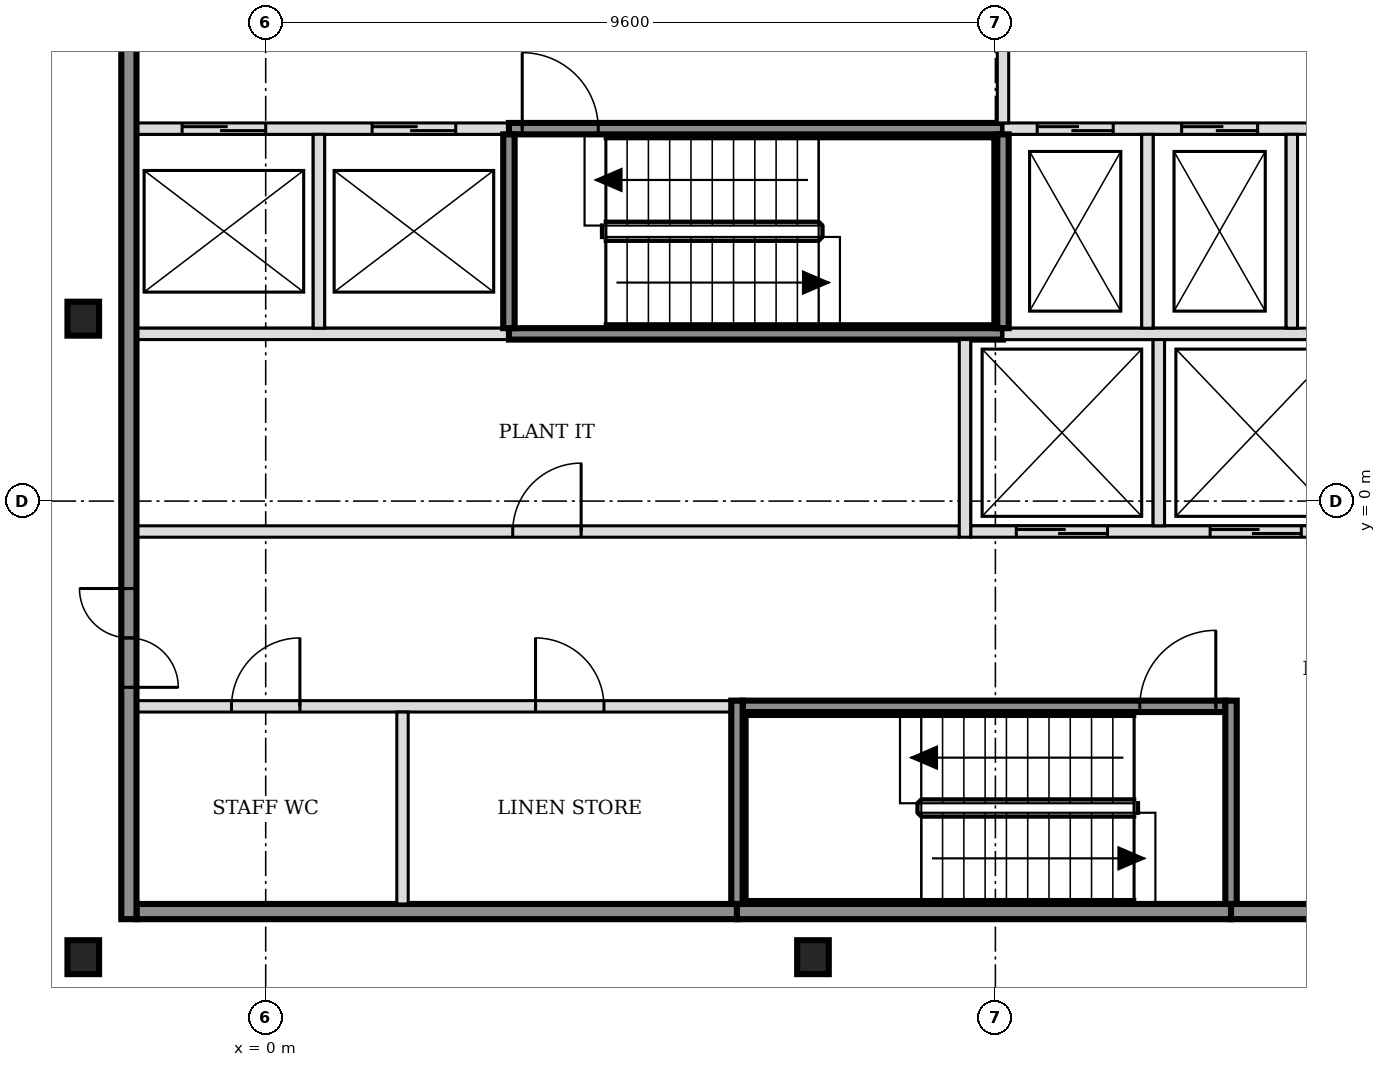
"""IFC4 building model, lengths in metres.
Left out: names, types, materials, properties, quantities, classifications, styles, units other than length and angle.
Written with IfcOpenShell. Run it as: python <this file> out.ifc"""

import sys

from ifc_helpers import new_model, si_unit, direction, frame, frame_2d, origin, origin_2d, place, context, subcontext, project, spatial, rectangle, i_section, extrude, element, fill, save


model = new_model("IFC4")
c1 = context("Model", 3, precision=1e-05, world=origin(), true_north=direction((0.0, 1.0)))
c2 = subcontext(c1, "Body", "Model", "MODEL_VIEW")
j1 = project(units=[si_unit("LENGTHUNIT", "METRE"), si_unit("PLANEANGLEUNIT", "RADIAN")], contexts=[c1])
p1 = place(None, origin())
s1 = spatial("IfcSite", under=j1, at=p1, CompositionType="ELEMENT")
p2 = place(p1, origin())
s2 = spatial("IfcBuilding", under=s1, at=p2, CompositionType="ELEMENT")
p3 = place(p2, frame((0.0, 0.0, 186.6)))
s3 = spatial("IfcBuildingStorey", under=s2, at=p3, CompositionType="ELEMENT", Elevation=186.6)
for number, where, z_axis, x_axis in (
    (1, (-2.4, -6.0, -0.15), (0.0, 0.0, 1.0), (1.0, 0.0, 0.0)),
    (2, (7.2, -6.0, -0.15), (0.0, 0.0, 1.0), (1.0, 0.0, 0.0)),
    (3, (-2.4, 2.4, -0.15), (0.0, 0.0, 1.0), (1.0, 0.0, 0.0)),
):
    element("IfcColumn", number, at=place(p3, frame(where, z_axis=z_axis, x_axis=x_axis)), inside=s3, PredefinedType="COLUMN", context=c2, shape_type="SweptSolid", body=[
        extrude(i_section(OverallWidth=0.416, OverallDepth=0.446, WebThickness=0.039, FlangeThickness=0.063, FilletRadius=0.015, at=origin_2d()), origin(), (0.0, 0.0, 1.0), 3.6),
    ])
p4 = place(p3, frame((-1.7, -5.4, 0.0), z_axis=(0.0, 0.0, 1.0), x_axis=(1.0, 0.0, 0.0)))
e4 = element("IfcWall", 4, at=p4, inside=s3, PredefinedType="SOLIDWALL", context=c2, shape_type="SweptSolid", body=[
    extrude(rectangle(XDim=7.9, YDim=0.2, at=frame_2d((3.95, 0.0))), origin(), (0.0, 0.0, 1.0), 3.45),
])
p5 = place(p3, frame((6.2, -5.4, 0.0), z_axis=(0.0, 0.0, 1.0), x_axis=(1.0, 0.0, 0.0)))
e5 = element("IfcWall", 5, at=p5, inside=s3, PredefinedType="SOLIDWALL", context=c2, shape_type="SweptSolid", body=[
    extrude(rectangle(XDim=6.5, YDim=0.2, at=frame_2d((3.25, 0.0))), origin(), (0.0, 0.0, 1.0), 3.45),
])
p6 = place(p3, frame((12.7, -5.4, 0.0), z_axis=(0.0, 0.0, 1.0), x_axis=(1.0, 0.0, 0.0)))
e6 = element("IfcWall", 6, at=p6, inside=s3, PredefinedType="SOLIDWALL", context=c2, shape_type="SweptSolid", body=[
    extrude(rectangle(XDim=3.4, YDim=0.2, at=frame_2d((1.7, 0.0))), origin(), (0.0, 0.0, 1.0), 3.45),
])
p7 = place(p3, frame((-1.7, -2.7, 0.0), z_axis=(0.0, 0.0, 1.0), x_axis=(1.0, 0.0, 0.0)))
e7 = element("IfcWall", 7, at=p7, inside=s3, PredefinedType="PARTITIONING", context=c2, shape_type="SweptSolid", body=[
    extrude(rectangle(XDim=7.825, YDim=0.15, at=frame_2d((3.913, 0.0))), origin(), (0.0, 0.0, 1.0), 3.45),
])
p8 = place(p7, frame((1.25, 0.0, 0.0)))
e8 = element("IfcOpeningElement", 8, at=p8, cuts=e7, PredefinedType="OPENING", context=c2, shape_type="SweptSolid", body=[
    extrude(rectangle(XDim=0.9, YDim=2.1, at=frame_2d((0.45, 1.05))), frame((0.0, 0.085, 0.0), z_axis=(0.0, -1.0, 0.0), x_axis=(1.0, 0.0, 0.0)), (0.0, 0.0, 1.0), 0.17),
])
p9 = place(p7, frame((5.25, 0.0, 0.0)))
e9 = element("IfcOpeningElement", 9, at=p9, cuts=e7, PredefinedType="OPENING", context=c2, shape_type="SweptSolid", body=[
    extrude(rectangle(XDim=0.9, YDim=2.1, at=frame_2d((0.45, 1.05))), frame((0.0, 0.085, 0.0), z_axis=(0.0, -1.0, 0.0), x_axis=(1.0, 0.0, 0.0)), (0.0, 0.0, 1.0), 0.17),
])
p10 = place(p3, frame((6.275, -2.7, 0.0), z_axis=(0.0, 0.0, 1.0), x_axis=(1.0, 0.0, 0.0)))
e10 = element("IfcWall", 10, at=p10, inside=s3, PredefinedType="SOLIDWALL", context=c2, shape_type="SweptSolid", body=[
    extrude(rectangle(XDim=6.35, YDim=0.15, at=frame_2d((3.175, 0.0))), origin(), (0.0, 0.0, 1.0), 3.45),
])
p11 = place(p10, frame((5.225, 0.0, 0.0)))
e11 = element("IfcOpeningElement", 11, at=p11, cuts=e10, PredefinedType="OPENING", context=c2, shape_type="SweptSolid", body=[
    extrude(rectangle(XDim=1.0, YDim=2.1, at=frame_2d((0.5, 1.05))), frame((0.0, 0.085, 0.0), z_axis=(0.0, -1.0, 0.0), x_axis=(1.0, 0.0, 0.0)), (0.0, 0.0, 1.0), 0.17),
])
p12 = place(p3, frame((-1.7, -0.4, 0.0), z_axis=(0.0, 0.0, 1.0), x_axis=(1.0, 0.0, 0.0)))
e12 = element("IfcWall", 12, at=p12, inside=s3, PredefinedType="PARTITIONING", context=c2, shape_type="SweptSolid", body=[
    extrude(rectangle(XDim=10.825, YDim=0.15, at=frame_2d((5.413, 0.0))), origin(), (0.0, 0.0, 1.0), 3.45),
])
p13 = place(p12, frame((4.95, 0.0, 0.0)))
e13 = element("IfcOpeningElement", 13, at=p13, cuts=e12, PredefinedType="OPENING", context=c2, shape_type="SweptSolid", body=[
    extrude(rectangle(XDim=0.9, YDim=2.1, at=frame_2d((0.45, 1.05))), frame((0.0, 0.085, 0.0), z_axis=(0.0, -1.0, 0.0), x_axis=(1.0, 0.0, 0.0)), (0.0, 0.0, 1.0), 0.17),
])
p14 = place(p3, frame((9.275, -0.4, 0.0), z_axis=(0.0, 0.0, 1.0), x_axis=(1.0, 0.0, 0.0)))
e14 = element("IfcWall", 14, at=p14, inside=s3, PredefinedType="SOLIDWALL", context=c2, shape_type="SweptSolid", body=[
    extrude(rectangle(XDim=4.95, YDim=0.15, at=frame_2d((2.475, 0.0))), origin(), (0.0, 0.0, 1.0), 3.45),
])
p15 = place(p14, frame((0.6, 0.0, 0.0)))
e15 = element("IfcOpeningElement", 15, at=p15, cuts=e14, PredefinedType="OPENING", context=c2, shape_type="SweptSolid", body=[
    extrude(rectangle(XDim=1.2, YDim=2.1, at=frame_2d((0.6, 1.05))), frame((0.0, 0.085, 0.0), z_axis=(0.0, -1.0, 0.0), x_axis=(1.0, 0.0, 0.0)), (0.0, 0.0, 1.0), 0.17),
])
p16 = place(p14, frame((3.15, 0.0, 0.0)))
e16 = element("IfcOpeningElement", 16, at=p16, cuts=e14, PredefinedType="OPENING", context=c2, shape_type="SweptSolid", body=[
    extrude(rectangle(XDim=1.2, YDim=2.1, at=frame_2d((0.6, 1.05))), frame((0.0, 0.085, 0.0), z_axis=(0.0, -1.0, 0.0), x_axis=(1.0, 0.0, 0.0)), (0.0, 0.0, 1.0), 0.17),
])
p17 = place(p3, frame((-1.7, 2.2, 0.0), z_axis=(0.0, 0.0, 1.0), x_axis=(1.0, 0.0, 0.0)))
e17 = element("IfcWall", 17, at=p17, inside=s3, PredefinedType="SOLIDWALL", context=c2, shape_type="SweptSolid", body=[
    extrude(rectangle(XDim=4.9, YDim=0.15, at=frame_2d((2.45, 0.0))), origin(), (0.0, 0.0, 1.0), 3.45),
])
p18 = place(p3, frame((3.2, 2.2, 0.0), z_axis=(0.0, 0.0, 1.0), x_axis=(1.0, 0.0, 0.0)))
e18 = element("IfcWall", 18, at=p18, inside=s3, PredefinedType="SOLIDWALL", context=c2, shape_type="SweptSolid", body=[
    extrude(rectangle(XDim=6.5, YDim=0.15, at=frame_2d((3.25, 0.0))), origin(), (0.0, 0.0, 1.0), 3.45),
])
p19 = place(p3, frame((9.7, 2.2, 0.0), z_axis=(0.0, 0.0, 1.0), x_axis=(1.0, 0.0, 0.0)))
e19 = element("IfcWall", 19, at=p19, inside=s3, PredefinedType="SOLIDWALL", context=c2, shape_type="SweptSolid", body=[
    extrude(rectangle(XDim=4.525, YDim=0.15, at=frame_2d((2.263, 0.0))), origin(), (0.0, 0.0, 1.0), 3.45),
])
p20 = place(p3, frame((-1.7, 4.9, 0.0), z_axis=(0.0, 0.0, 1.0), x_axis=(1.0, 0.0, 0.0)))
e20 = element("IfcWall", 20, at=p20, inside=s3, PredefinedType="SOLIDWALL", context=c2, shape_type="SweptSolid", body=[
    extrude(rectangle(XDim=4.9, YDim=0.15, at=frame_2d((2.45, 0.0))), origin(), (0.0, 0.0, 1.0), 3.45),
])
p21 = place(p20, frame((0.6, 0.0, 0.0)))
e21 = element("IfcOpeningElement", 21, at=p21, cuts=e20, PredefinedType="OPENING", context=c2, shape_type="SweptSolid", body=[
    extrude(rectangle(XDim=1.1, YDim=2.1, at=frame_2d((0.55, 1.05))), frame((0.0, 0.085, 0.0), z_axis=(0.0, -1.0, 0.0), x_axis=(1.0, 0.0, 0.0)), (0.0, 0.0, 1.0), 0.17),
])
p22 = place(p20, frame((3.1, 0.0, 0.0)))
e22 = element("IfcOpeningElement", 22, at=p22, cuts=e20, PredefinedType="OPENING", context=c2, shape_type="SweptSolid", body=[
    extrude(rectangle(XDim=1.1, YDim=2.1, at=frame_2d((0.55, 1.05))), frame((0.0, 0.085, 0.0), z_axis=(0.0, -1.0, 0.0), x_axis=(1.0, 0.0, 0.0)), (0.0, 0.0, 1.0), 0.17),
])
p23 = place(p3, frame((3.2, 4.9, 0.0), z_axis=(0.0, 0.0, 1.0), x_axis=(1.0, 0.0, 0.0)))
e23 = element("IfcWall", 23, at=p23, inside=s3, PredefinedType="SOLIDWALL", context=c2, shape_type="SweptSolid", body=[
    extrude(rectangle(XDim=6.5, YDim=0.15, at=frame_2d((3.25, 0.0))), origin(), (0.0, 0.0, 1.0), 3.45),
])
p24 = place(p23, frame((0.175, 0.0, 0.0)))
e24 = element("IfcOpeningElement", 24, at=p24, cuts=e23, PredefinedType="OPENING", context=c2, shape_type="SweptSolid", body=[
    extrude(rectangle(XDim=1.0, YDim=2.1, at=frame_2d((0.5, 1.05))), frame((0.0, 0.085, 0.0), z_axis=(0.0, -1.0, 0.0), x_axis=(1.0, 0.0, 0.0)), (0.0, 0.0, 1.0), 0.17),
])
p25 = place(p3, frame((9.7, 4.9, 0.0), z_axis=(0.0, 0.0, 1.0), x_axis=(1.0, 0.0, 0.0)))
e25 = element("IfcWall", 25, at=p25, inside=s3, PredefinedType="SOLIDWALL", context=c2, shape_type="SweptSolid", body=[
    extrude(rectangle(XDim=6.4, YDim=0.15, at=frame_2d((3.2, 0.0))), origin(), (0.0, 0.0, 1.0), 3.45),
])
p26 = place(p25, frame((0.45, 0.0, 0.0)))
e26 = element("IfcOpeningElement", 26, at=p26, cuts=e25, PredefinedType="OPENING", context=c2, shape_type="SweptSolid", body=[
    extrude(rectangle(XDim=1.0, YDim=2.1, at=frame_2d((0.5, 1.05))), frame((0.0, 0.085, 0.0), z_axis=(0.0, -1.0, 0.0), x_axis=(1.0, 0.0, 0.0)), (0.0, 0.0, 1.0), 0.17),
])
p27 = place(p25, frame((2.35, 0.0, 0.0)))
e27 = element("IfcOpeningElement", 27, at=p27, cuts=e25, PredefinedType="OPENING", context=c2, shape_type="SweptSolid", body=[
    extrude(rectangle(XDim=1.0, YDim=2.1, at=frame_2d((0.5, 1.05))), frame((0.0, 0.085, 0.0), z_axis=(0.0, -1.0, 0.0), x_axis=(1.0, 0.0, 0.0)), (0.0, 0.0, 1.0), 0.17),
])
p28 = place(p25, frame((4.7, 0.0, 0.0)))
e28 = element("IfcOpeningElement", 28, at=p28, cuts=e25, PredefinedType="OPENING", context=c2, shape_type="SweptSolid", body=[
    extrude(rectangle(XDim=0.9, YDim=2.1, at=frame_2d((0.45, 1.05))), frame((0.0, 0.085, 0.0), z_axis=(0.0, -1.0, 0.0), x_axis=(1.0, 0.0, 0.0)), (0.0, 0.0, 1.0), 0.17),
])
p29 = place(p3, frame((-1.8, -5.5, 0.0), z_axis=(0.0, 0.0, 1.0), x_axis=(0.0, 1.0, 0.0)))
e29 = element("IfcWall", 29, at=p29, inside=s3, PredefinedType="SOLIDWALL", context=c2, shape_type="SweptSolid", body=[
    extrude(rectangle(XDim=15.8, YDim=0.2, at=frame_2d((7.9, 0.0))), origin(), (0.0, 0.0, 1.0), 3.45),
])
p30 = place(p29, frame((3.05, 0.0, 0.0)))
e30 = element("IfcOpeningElement", 30, at=p30, cuts=e29, PredefinedType="OPENING", context=c2, shape_type="SweptSolid", body=[
    extrude(rectangle(XDim=1.3, YDim=2.1, at=frame_2d((0.65, 1.05))), frame((0.0, 0.11, 0.0), z_axis=(0.0, -1.0, 0.0), x_axis=(1.0, 0.0, 0.0)), (0.0, 0.0, 1.0), 0.22),
])
p31 = place(p29, frame((11.45, 0.0, 0.0)))
e31 = element("IfcOpeningElement", 31, at=p31, cuts=e29, PredefinedType="OPENING", context=c2, shape_type="SweptSolid", body=[
    extrude(rectangle(XDim=1.3, YDim=2.1, at=frame_2d((0.65, 1.05))), frame((0.0, 0.11, 0.0), z_axis=(0.0, -1.0, 0.0), x_axis=(1.0, 0.0, 0.0)), (0.0, 0.0, 1.0), 0.22),
])
p32 = place(p3, frame((0.7, 2.275, 0.0), z_axis=(0.0, 0.0, 1.0), x_axis=(0.0, 1.0, 0.0)))
e32 = element("IfcWall", 32, at=p32, inside=s3, PredefinedType="SOLIDWALL", context=c2, shape_type="SweptSolid", body=[
    extrude(rectangle(XDim=2.55, YDim=0.15, at=frame_2d((1.275, 0.0))), origin(), (0.0, 0.0, 1.0), 3.45),
])
p33 = place(p3, frame((1.8, -5.3, 0.0), z_axis=(0.0, 0.0, 1.0), x_axis=(0.0, 1.0, 0.0)))
e33 = element("IfcWall", 33, at=p33, inside=s3, PredefinedType="PARTITIONING", context=c2, shape_type="SweptSolid", body=[
    extrude(rectangle(XDim=2.525, YDim=0.15, at=frame_2d((1.263, 0.0))), origin(), (0.0, 0.0, 1.0), 3.45),
])
p34 = place(p3, frame((3.2, 2.275, 0.0), z_axis=(0.0, 0.0, 1.0), x_axis=(0.0, 1.0, 0.0)))
e34 = element("IfcWall", 34, at=p34, inside=s3, PredefinedType="SOLIDWALL", context=c2, shape_type="SweptSolid", body=[
    extrude(rectangle(XDim=2.55, YDim=0.15, at=frame_2d((1.275, 0.0))), origin(), (0.0, 0.0, 1.0), 3.45),
])
p35 = place(p3, frame((6.2, -5.3, 0.0), z_axis=(0.0, 0.0, 1.0), x_axis=(0.0, 1.0, 0.0)))
e35 = element("IfcWall", 35, at=p35, inside=s3, PredefinedType="SOLIDWALL", context=c2, shape_type="SweptSolid", body=[
    extrude(rectangle(XDim=2.675, YDim=0.15, at=frame_2d((1.337, 0.0))), origin(), (0.0, 0.0, 1.0), 3.45),
])
p36 = place(p3, frame((9.2, -0.475, 0.0), z_axis=(0.0, 0.0, 1.0), x_axis=(0.0, 1.0, 0.0)))
e36 = element("IfcWall", 36, at=p36, inside=s3, PredefinedType="SOLIDWALL", context=c2, shape_type="SweptSolid", body=[
    extrude(rectangle(XDim=2.6, YDim=0.15, at=frame_2d((1.3, 0.0))), origin(), (0.0, 0.0, 1.0), 3.45),
])
p37 = place(p3, frame((9.7, 2.275, 0.0), z_axis=(0.0, 0.0, 1.0), x_axis=(0.0, 1.0, 0.0)))
e37 = element("IfcWall", 37, at=p37, inside=s3, PredefinedType="SOLIDWALL", context=c2, shape_type="SweptSolid", body=[
    extrude(rectangle(XDim=2.55, YDim=0.15, at=frame_2d((1.275, 0.0))), origin(), (0.0, 0.0, 1.0), 3.45),
])
p38 = place(p3, frame((9.7, 4.975, 0.0), z_axis=(0.0, 0.0, 1.0), x_axis=(0.0, 1.0, 0.0)))
e38 = element("IfcWall", 38, at=p38, inside=s3, PredefinedType="SOLIDWALL", context=c2, shape_type="SweptSolid", body=[
    extrude(rectangle(XDim=2.45, YDim=0.15, at=frame_2d((1.225, 0.0))), origin(), (0.0, 0.0, 1.0), 3.45),
])
p39 = place(p3, frame((11.6, 2.275, 0.0), z_axis=(0.0, 0.0, 1.0), x_axis=(0.0, 1.0, 0.0)))
e39 = element("IfcWall", 39, at=p39, inside=s3, PredefinedType="SOLIDWALL", context=c2, shape_type="SweptSolid", body=[
    extrude(rectangle(XDim=2.55, YDim=0.15, at=frame_2d((1.275, 0.0))), origin(), (0.0, 0.0, 1.0), 3.45),
])
p40 = place(p3, frame((11.75, -0.325, 0.0), z_axis=(0.0, 0.0, 1.0), x_axis=(0.0, 1.0, 0.0)))
e40 = element("IfcWall", 40, at=p40, inside=s3, PredefinedType="SOLIDWALL", context=c2, shape_type="SweptSolid", body=[
    extrude(rectangle(XDim=2.45, YDim=0.15, at=frame_2d((1.225, 0.0))), origin(), (0.0, 0.0, 1.0), 3.45),
])
p41 = place(p3, frame((12.7, -5.3, 0.0), z_axis=(0.0, 0.0, 1.0), x_axis=(0.0, 1.0, 0.0)))
e41 = element("IfcWall", 41, at=p41, inside=s3, PredefinedType="SOLIDWALL", context=c2, shape_type="SweptSolid", body=[
    extrude(rectangle(XDim=2.675, YDim=0.15, at=frame_2d((1.337, 0.0))), origin(), (0.0, 0.0, 1.0), 3.45),
])
p42 = place(p3, frame((13.5, 2.275, 0.0), z_axis=(0.0, 0.0, 1.0), x_axis=(0.0, 1.0, 0.0)))
e42 = element("IfcWall", 42, at=p42, inside=s3, PredefinedType="SOLIDWALL", context=c2, shape_type="SweptSolid", body=[
    extrude(rectangle(XDim=2.55, YDim=0.15, at=frame_2d((1.275, 0.0))), origin(), (0.0, 0.0, 1.0), 3.45),
])
p43 = place(p15, origin())
e43 = element("IfcDoor", 43, at=p43, inside=s3, OperationType="DOUBLE_DOOR_SLIDING", PredefinedType="DOOR", context=c2, shape_type="SweptSolid", body=[
    extrude(rectangle(XDim=1.2, YDim=2.1, at=frame_2d((0.6, 1.05))), frame((0.0, 0.025, 0.0), z_axis=(0.0, -1.0, 0.0), x_axis=(1.0, 0.0, 0.0)), (0.0, 0.0, 1.0), 0.05),
])
fill(e15, e43)
p44 = place(p16, origin())
e44 = element("IfcDoor", 44, at=p44, inside=s3, OperationType="DOUBLE_DOOR_SLIDING", PredefinedType="DOOR", context=c2, shape_type="SweptSolid", body=[
    extrude(rectangle(XDim=1.2, YDim=2.1, at=frame_2d((0.6, 1.05))), frame((0.0, 0.025, 0.0), z_axis=(0.0, -1.0, 0.0), x_axis=(1.0, 0.0, 0.0)), (0.0, 0.0, 1.0), 0.05),
])
fill(e16, e44)
p45 = place(p21, origin())
e45 = element("IfcDoor", 45, at=p45, inside=s3, OperationType="DOUBLE_DOOR_SLIDING", PredefinedType="DOOR", context=c2, shape_type="SweptSolid", body=[
    extrude(rectangle(XDim=1.1, YDim=2.1, at=frame_2d((0.55, 1.05))), frame((0.0, 0.025, 0.0), z_axis=(0.0, -1.0, 0.0), x_axis=(1.0, 0.0, 0.0)), (0.0, 0.0, 1.0), 0.05),
])
fill(e21, e45)
p46 = place(p22, origin())
e46 = element("IfcDoor", 46, at=p46, inside=s3, OperationType="DOUBLE_DOOR_SLIDING", PredefinedType="DOOR", context=c2, shape_type="SweptSolid", body=[
    extrude(rectangle(XDim=1.1, YDim=2.1, at=frame_2d((0.55, 1.05))), frame((0.0, 0.025, 0.0), z_axis=(0.0, -1.0, 0.0), x_axis=(1.0, 0.0, 0.0)), (0.0, 0.0, 1.0), 0.05),
])
fill(e22, e46)
p47 = place(p26, origin())
e47 = element("IfcDoor", 47, at=p47, inside=s3, OperationType="DOUBLE_DOOR_SLIDING", PredefinedType="DOOR", context=c2, shape_type="SweptSolid", body=[
    extrude(rectangle(XDim=1.0, YDim=2.1, at=frame_2d((0.5, 1.05))), frame((0.0, 0.025, 0.0), z_axis=(0.0, -1.0, 0.0), x_axis=(1.0, 0.0, 0.0)), (0.0, 0.0, 1.0), 0.05),
])
fill(e26, e47)
p48 = place(p27, origin())
e48 = element("IfcDoor", 48, at=p48, inside=s3, OperationType="DOUBLE_DOOR_SLIDING", PredefinedType="DOOR", context=c2, shape_type="SweptSolid", body=[
    extrude(rectangle(XDim=1.0, YDim=2.1, at=frame_2d((0.5, 1.05))), frame((0.0, 0.025, 0.0), z_axis=(0.0, -1.0, 0.0), x_axis=(1.0, 0.0, 0.0)), (0.0, 0.0, 1.0), 0.05),
])
fill(e27, e48)
p49 = place(p11, origin())
e49 = element("IfcDoor", 49, at=p49, inside=s3, OperationType="SINGLE_SWING_RIGHT", PredefinedType="DOOR", context=c2, shape_type="SweptSolid", body=[
    extrude(rectangle(XDim=1.0, YDim=2.1, at=frame_2d((0.5, 1.05))), frame((0.0, 0.025, 0.0), z_axis=(0.0, -1.0, 0.0), x_axis=(1.0, 0.0, 0.0)), (0.0, 0.0, 1.0), 0.05),
])
fill(e11, e49)
p50 = place(p24, origin())
e50 = element("IfcDoor", 50, at=p50, inside=s3, OperationType="SINGLE_SWING_LEFT", PredefinedType="DOOR", context=c2, shape_type="SweptSolid", body=[
    extrude(rectangle(XDim=1.0, YDim=2.1, at=frame_2d((0.5, 1.05))), frame((0.0, 0.025, 0.0), z_axis=(0.0, -1.0, 0.0), x_axis=(1.0, 0.0, 0.0)), (0.0, 0.0, 1.0), 0.05),
])
fill(e24, e50)
p51 = place(p30, origin())
e51 = element("IfcDoor", 51, at=p51, inside=s3, OperationType="DOUBLE_DOOR_SINGLE_SWING", PredefinedType="DOOR", context=c2, shape_type="SweptSolid", body=[
    extrude(rectangle(XDim=1.3, YDim=2.1, at=frame_2d((0.65, 1.05))), frame((0.0, 0.025, 0.0), z_axis=(0.0, -1.0, 0.0), x_axis=(1.0, 0.0, 0.0)), (0.0, 0.0, 1.0), 0.05),
])
fill(e30, e51)
p52 = place(p8, origin())
e52 = element("IfcDoor", 52, at=p52, inside=s3, OperationType="SINGLE_SWING_RIGHT", PredefinedType="DOOR", context=c2, shape_type="SweptSolid", body=[
    extrude(rectangle(XDim=0.9, YDim=2.1, at=frame_2d((0.45, 1.05))), frame((0.0, 0.025, 0.0), z_axis=(0.0, -1.0, 0.0), x_axis=(1.0, 0.0, 0.0)), (0.0, 0.0, 1.0), 0.05),
])
fill(e8, e52)
p53 = place(p9, origin())
e53 = element("IfcDoor", 53, at=p53, inside=s3, OperationType="SINGLE_SWING_LEFT", PredefinedType="DOOR", context=c2, shape_type="SweptSolid", body=[
    extrude(rectangle(XDim=0.9, YDim=2.1, at=frame_2d((0.45, 1.05))), frame((0.0, 0.025, 0.0), z_axis=(0.0, -1.0, 0.0), x_axis=(1.0, 0.0, 0.0)), (0.0, 0.0, 1.0), 0.05),
])
fill(e9, e53)
p54 = place(p13, origin())
e54 = element("IfcDoor", 54, at=p54, inside=s3, OperationType="SINGLE_SWING_RIGHT", PredefinedType="DOOR", context=c2, shape_type="SweptSolid", body=[
    extrude(rectangle(XDim=0.9, YDim=2.1, at=frame_2d((0.45, 1.05))), frame((0.0, 0.025, 0.0), z_axis=(0.0, -1.0, 0.0), x_axis=(1.0, 0.0, 0.0)), (0.0, 0.0, 1.0), 0.05),
])
fill(e13, e54)
save(model, sys.argv[1])
